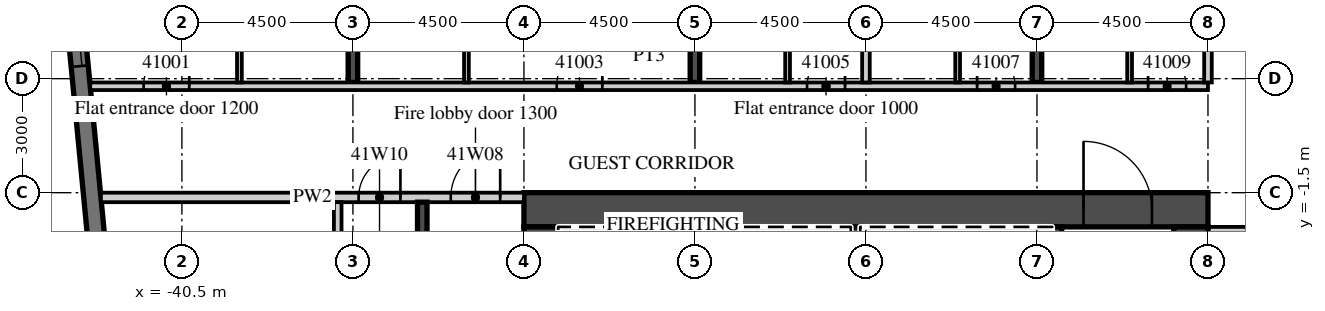
"""IFC4 building model, lengths in metres.
Left out: names, types, materials, properties, quantities, classifications, styles, units other than length and angle.
Written with IfcOpenShell. Run it as: python <this file> out.ifc"""

import sys

from ifc_helpers import new_model, si_unit, direction, frame, frame_2d, origin, place, context, subcontext, project, spatial, rectangle, extrude, element, fill, save


model = new_model("IFC4")
c1 = context("Model", 3, precision=1e-05, world=origin(), true_north=direction((0.0, 1.0)))
c2 = subcontext(c1, "Body", "Model", "MODEL_VIEW")
j1 = project(units=[si_unit("LENGTHUNIT", "METRE"), si_unit("PLANEANGLEUNIT", "RADIAN")], contexts=[c1])
p1 = place(None, origin())
s1 = spatial("IfcSite", under=j1, at=p1, CompositionType="ELEMENT")
p2 = place(p1, origin())
s2 = spatial("IfcBuilding", under=s1, at=p2, CompositionType="ELEMENT")
p3 = place(p2, frame((0.0, 0.0, 176.8)))
s3 = spatial("IfcBuildingStorey", under=s2, at=p3, CompositionType="ELEMENT", Elevation=176.8)
p4 = place(p3, frame((-36.0, 1.4, 0.0), z_axis=(0.0, 0.0, 1.0), x_axis=(0.0, 1.0, 0.0)))
e1 = element("IfcWall", 1, at=p4, inside=s3, PredefinedType="SHEAR", context=c2, shape_type="SweptSolid", body=[
    extrude(rectangle(XDim=15.401, YDim=0.25, at=frame_2d((7.701, 0.0))), origin(), (0.0, 0.0, 1.0), 3.3),
])
p5 = place(p3, frame((-27.0, 1.4, 0.0), z_axis=(0.0, 0.0, 1.0), x_axis=(0.0, 1.0, 0.0)))
e2 = element("IfcWall", 2, at=p5, inside=s3, PredefinedType="SHEAR", context=c2, shape_type="SweptSolid", body=[
    extrude(rectangle(XDim=16.268, YDim=0.25, at=frame_2d((8.134, 0.0))), origin(), (0.0, 0.0, 1.0), 3.3),
])
p6 = place(p3, frame((-18.0, 1.4, 0.0), z_axis=(0.0, 0.0, 1.0), x_axis=(0.0, 1.0, 0.0)))
e3 = element("IfcWall", 3, at=p6, inside=s3, PredefinedType="SHEAR", context=c2, shape_type="SweptSolid", body=[
    extrude(rectangle(XDim=17.134, YDim=0.25, at=frame_2d((8.567, 0.0))), origin(), (0.0, 0.0, 1.0), 3.3),
])
p7 = place(p3, frame((-44.214, 12.466, 0.0), z_axis=(0.0, 0.0, 1.0), x_axis=(0.095847314626, -0.995396047952, 0.0)))
e4 = element("IfcWall", 4, at=p7, inside=s3, PredefinedType="SOLIDWALL", context=c2, shape_type="SweptSolid", body=[
    extrude(rectangle(XDim=34.0, YDim=0.45, at=frame_2d((17.0, 0.0))), origin(), (0.0, 0.0, 1.0), 3.02),
])
p8 = place(p7, frame((2.865, 0.0, 0.45)))
e5 = element("IfcOpeningElement", 5, at=p8, cuts=e4, PredefinedType="OPENING", context=c2, shape_type="SweptSolid", body=[
    extrude(rectangle(XDim=3.3, YDim=2.25, at=frame_2d((1.65, 1.125))), frame((0.0, 0.235, 0.0), z_axis=(0.0, -1.0, 0.0), x_axis=(1.0, 0.0, 0.0)), (0.0, 0.0, 1.0), 0.47),
])
p9 = place(p7, frame((7.386, 0.0, 0.45)))
e6 = element("IfcOpeningElement", 6, at=p9, cuts=e4, PredefinedType="OPENING", context=c2, shape_type="SweptSolid", body=[
    extrude(rectangle(XDim=3.3, YDim=2.25, at=frame_2d((1.65, 1.125))), frame((0.0, 0.235, 0.0), z_axis=(0.0, -1.0, 0.0), x_axis=(1.0, 0.0, 0.0)), (0.0, 0.0, 1.0), 0.47),
])
p10 = place(p3, frame((-42.913, 1.3, 0.0), z_axis=(0.0, 0.0, 1.0), x_axis=(1.0, 0.0, 0.0)))
e7 = element("IfcWall", 7, at=p10, inside=s3, PredefinedType="PARTITIONING", context=c2, shape_type="SweptSolid", body=[
    extrude(rectangle(XDim=29.413, YDim=0.2, at=frame_2d((14.707, 0.0))), origin(), (0.0, 0.0, 1.0), 3.02),
])
p11 = place(p10, frame((1.406, 0.0, 0.0)))
e8 = element("IfcOpeningElement", 8, at=p11, cuts=e7, PredefinedType="OPENING", context=c2, shape_type="SweptSolid", body=[
    extrude(rectangle(XDim=1.2, YDim=2.1, at=frame_2d((0.6, 1.05))), frame((0.0, 0.11, 0.0), z_axis=(0.0, -1.0, 0.0), x_axis=(1.0, 0.0, 0.0)), (0.0, 0.0, 1.0), 0.22),
])
p12 = place(p10, frame((12.275, 0.0, 0.0)))
e9 = element("IfcOpeningElement", 9, at=p12, cuts=e7, PredefinedType="OPENING", context=c2, shape_type="SweptSolid", body=[
    extrude(rectangle(XDim=1.2, YDim=2.1, at=frame_2d((0.6, 1.05))), frame((0.0, 0.11, 0.0), z_axis=(0.0, -1.0, 0.0), x_axis=(1.0, 0.0, 0.0)), (0.0, 0.0, 1.0), 0.22),
])
p13 = place(p10, frame((18.863, 0.0, 0.0)))
e10 = element("IfcOpeningElement", 10, at=p13, cuts=e7, PredefinedType="OPENING", context=c2, shape_type="SweptSolid", body=[
    extrude(rectangle(XDim=1.0, YDim=2.1, at=frame_2d((0.5, 1.05))), frame((0.0, 0.11, 0.0), z_axis=(0.0, -1.0, 0.0), x_axis=(1.0, 0.0, 0.0)), (0.0, 0.0, 1.0), 0.22),
])
p14 = place(p10, frame((23.338, 0.0, 0.0)))
e11 = element("IfcOpeningElement", 11, at=p14, cuts=e7, PredefinedType="OPENING", context=c2, shape_type="SweptSolid", body=[
    extrude(rectangle(XDim=1.0, YDim=2.1, at=frame_2d((0.5, 1.05))), frame((0.0, 0.11, 0.0), z_axis=(0.0, -1.0, 0.0), x_axis=(1.0, 0.0, 0.0)), (0.0, 0.0, 1.0), 0.22),
])
p15 = place(p10, frame((27.838, 0.0, 0.0)))
e12 = element("IfcOpeningElement", 12, at=p15, cuts=e7, PredefinedType="OPENING", context=c2, shape_type="SweptSolid", body=[
    extrude(rectangle(XDim=1.0, YDim=2.1, at=frame_2d((0.5, 1.05))), frame((0.0, 0.11, 0.0), z_axis=(0.0, -1.0, 0.0), x_axis=(1.0, 0.0, 0.0)), (0.0, 0.0, 1.0), 0.22),
])
p16 = place(p3, frame((-38.987, 1.4, 0.0), z_axis=(0.0, 0.0, 1.0), x_axis=(0.0, 1.0, 0.0)))
e13 = element("IfcWall", 13, at=p16, inside=s3, PredefinedType="PARTITIONING", context=c2, shape_type="SweptSolid", body=[
    extrude(rectangle(XDim=4.028, YDim=0.125, at=frame_2d((2.014, 0.0))), origin(), (0.0, 0.0, 1.0), 3.02),
])
p17 = place(p16, frame((2.45, 0.0, 0.0)))
e14 = element("IfcOpeningElement", 14, at=p17, cuts=e13, PredefinedType="OPENING", context=c2, shape_type="SweptSolid", body=[
    extrude(rectangle(XDim=0.9, YDim=2.1, at=frame_2d((0.45, 1.05))), frame((0.0, 0.073, 0.0), z_axis=(0.0, -1.0, 0.0), x_axis=(1.0, 0.0, 0.0)), (0.0, 0.0, 1.0), 0.145),
])
p18 = place(p3, frame((-33.013, 1.4, 0.0), z_axis=(0.0, 0.0, 1.0), x_axis=(0.0, 1.0, 0.0)))
e15 = element("IfcWall", 15, at=p18, inside=s3, PredefinedType="PARTITIONING", context=c2, shape_type="SweptSolid", body=[
    extrude(rectangle(XDim=5.225, YDim=0.125, at=frame_2d((2.613, 0.0))), origin(), (0.0, 0.0, 1.0), 3.02),
])
p19 = place(p18, frame((2.45, 0.0, 0.0)))
e16 = element("IfcOpeningElement", 16, at=p19, cuts=e15, PredefinedType="OPENING", context=c2, shape_type="SweptSolid", body=[
    extrude(rectangle(XDim=0.9, YDim=2.1, at=frame_2d((0.45, 1.05))), frame((0.0, 0.073, 0.0), z_axis=(0.0, -1.0, 0.0), x_axis=(1.0, 0.0, 0.0)), (0.0, 0.0, 1.0), 0.145),
])
p20 = place(p3, frame((-22.5, 1.4, 0.0), z_axis=(0.0, 0.0, 1.0), x_axis=(0.0, 1.0, 0.0)))
e17 = element("IfcWall", 17, at=p20, inside=s3, PredefinedType="PARTITIONING", context=c2, shape_type="SweptSolid", body=[
    extrude(rectangle(XDim=16.723, YDim=0.2, at=frame_2d((8.362, 0.0))), origin(), (0.0, 0.0, 1.0), 3.02),
])
p21 = place(p3, frame((-24.562, 1.4, 0.0), z_axis=(0.0, 0.0, 1.0), x_axis=(0.0, 1.0, 0.0)))
e18 = element("IfcWall", 18, at=p21, inside=s3, PredefinedType="PARTITIONING", context=c2, shape_type="SweptSolid", body=[
    extrude(rectangle(XDim=5.225, YDim=0.125, at=frame_2d((2.613, 0.0))), origin(), (0.0, 0.0, 1.0), 3.02),
])
p22 = place(p21, frame((2.45, 0.0, 0.0)))
e19 = element("IfcOpeningElement", 19, at=p22, cuts=e18, PredefinedType="OPENING", context=c2, shape_type="SweptSolid", body=[
    extrude(rectangle(XDim=0.9, YDim=2.1, at=frame_2d((0.45, 1.05))), frame((0.0, 0.073, 0.0), z_axis=(0.0, -1.0, 0.0), x_axis=(1.0, 0.0, 0.0)), (0.0, 0.0, 1.0), 0.145),
])
p23 = place(p3, frame((-20.087, 1.4, 0.0), z_axis=(0.0, 0.0, 1.0), x_axis=(0.0, 1.0, 0.0)))
e20 = element("IfcWall", 20, at=p23, inside=s3, PredefinedType="PARTITIONING", context=c2, shape_type="SweptSolid", body=[
    extrude(rectangle(XDim=5.225, YDim=0.125, at=frame_2d((2.613, 0.0))), origin(), (0.0, 0.0, 1.0), 3.02),
])
p24 = place(p23, frame((2.45, 0.0, 0.0)))
e21 = element("IfcOpeningElement", 21, at=p24, cuts=e20, PredefinedType="OPENING", context=c2, shape_type="SweptSolid", body=[
    extrude(rectangle(XDim=0.9, YDim=2.1, at=frame_2d((0.45, 1.05))), frame((0.0, 0.073, 0.0), z_axis=(0.0, -1.0, 0.0), x_axis=(1.0, 0.0, 0.0)), (0.0, 0.0, 1.0), 0.145),
])
p25 = place(p3, frame((-13.5, 1.4, 0.0), z_axis=(0.0, 0.0, 1.0), x_axis=(0.0, 1.0, 0.0)))
e22 = element("IfcWall", 22, at=p25, inside=s3, PredefinedType="PARTITIONING", context=c2, shape_type="SweptSolid", body=[
    extrude(rectangle(XDim=17.59, YDim=0.2, at=frame_2d((8.795, 0.0))), origin(), (0.0, 0.0, 1.0), 3.02),
])
p26 = place(p3, frame((-15.562, 1.4, 0.0), z_axis=(0.0, 0.0, 1.0), x_axis=(0.0, 1.0, 0.0)))
e23 = element("IfcWall", 23, at=p26, inside=s3, PredefinedType="PARTITIONING", context=c2, shape_type="SweptSolid", body=[
    extrude(rectangle(XDim=5.225, YDim=0.125, at=frame_2d((2.613, 0.0))), origin(), (0.0, 0.0, 1.0), 3.02),
])
p27 = place(p26, frame((2.45, 0.0, 0.0)))
e24 = element("IfcOpeningElement", 24, at=p27, cuts=e23, PredefinedType="OPENING", context=c2, shape_type="SweptSolid", body=[
    extrude(rectangle(XDim=0.9, YDim=2.1, at=frame_2d((0.45, 1.05))), frame((0.0, 0.073, 0.0), z_axis=(0.0, -1.0, 0.0), x_axis=(1.0, 0.0, 0.0)), (0.0, 0.0, 1.0), 0.145),
])
p28 = place(p3, frame((-13.5, -2.5, 0.0), z_axis=(0.0, 0.0, 1.0), x_axis=(1.0, 0.0, 0.0)))
e25 = element("IfcWall", 25, at=p28, inside=s3, PredefinedType="PARTITIONING", context=c2, shape_type="SweptSolid", body=[
    extrude(rectangle(XDim=27.0, YDim=0.2, at=frame_2d((13.5, 0.0))), origin(), (0.0, 0.0, 1.0), 3.02),
])
p29 = place(p28, frame((2.925, 0.0, 0.0)))
e26 = element("IfcOpeningElement", 26, at=p29, cuts=e25, PredefinedType="OPENING", context=c2, shape_type="SweptSolid", body=[
    extrude(rectangle(XDim=1.0, YDim=2.1, at=frame_2d((0.5, 1.05))), frame((0.0, 0.11, 0.0), z_axis=(0.0, -1.0, 0.0), x_axis=(1.0, 0.0, 0.0)), (0.0, 0.0, 1.0), 0.22),
])
p30 = place(p28, frame((7.45, 0.0, 0.0)))
e27 = element("IfcOpeningElement", 27, at=p30, cuts=e25, PredefinedType="OPENING", context=c2, shape_type="SweptSolid", body=[
    extrude(rectangle(XDim=1.0, YDim=2.1, at=frame_2d((0.5, 1.05))), frame((0.0, 0.11, 0.0), z_axis=(0.0, -1.0, 0.0), x_axis=(1.0, 0.0, 0.0)), (0.0, 0.0, 1.0), 0.22),
])
p31 = place(p28, frame((11.925, 0.0, 0.0)))
e28 = element("IfcOpeningElement", 28, at=p31, cuts=e25, PredefinedType="OPENING", context=c2, shape_type="SweptSolid", body=[
    extrude(rectangle(XDim=1.0, YDim=2.1, at=frame_2d((0.5, 1.05))), frame((0.0, 0.11, 0.0), z_axis=(0.0, -1.0, 0.0), x_axis=(1.0, 0.0, 0.0)), (0.0, 0.0, 1.0), 0.22),
])
p32 = place(p28, frame((18.862, 0.0, 0.0)))
e29 = element("IfcOpeningElement", 29, at=p32, cuts=e25, PredefinedType="OPENING", context=c2, shape_type="SweptSolid", body=[
    extrude(rectangle(XDim=1.2, YDim=2.1, at=frame_2d((0.6, 1.05))), frame((0.0, 0.11, 0.0), z_axis=(0.0, -1.0, 0.0), x_axis=(1.0, 0.0, 0.0)), (0.0, 0.0, 1.0), 0.22),
])
p33 = place(p28, frame((25.425, 0.0, 0.0)))
e30 = element("IfcOpeningElement", 30, at=p33, cuts=e25, PredefinedType="OPENING", context=c2, shape_type="SweptSolid", body=[
    extrude(rectangle(XDim=1.0, YDim=2.1, at=frame_2d((0.5, 1.05))), frame((0.0, 0.11, 0.0), z_axis=(0.0, -1.0, 0.0), x_axis=(1.0, 0.0, 0.0)), (0.0, 0.0, 1.0), 0.22),
])
p34 = place(p3, frame((-31.5, -1.95, 0.0), z_axis=(0.0, 0.0, 1.0), x_axis=(1.0, 0.0, 0.0)))
e31 = element("IfcWall", 31, at=p34, inside=s3, PredefinedType="SHEAR", context=c2, shape_type="SweptSolid", body=[
    extrude(rectangle(XDim=18.0, YDim=0.9, at=frame_2d((9.0, 0.0))), origin(), (0.0, 0.0, 1.0), 3.02),
])
p35 = place(p34, frame((14.725, 0.0, 0.0)))
e32 = element("IfcOpeningElement", 32, at=p35, cuts=e31, PredefinedType="OPENING", context=c2, shape_type="SweptSolid", body=[
    extrude(rectangle(XDim=1.8, YDim=2.1, at=frame_2d((0.9, 1.05))), frame((0.0, 0.46, 0.0), z_axis=(0.0, -1.0, 0.0), x_axis=(1.0, 0.0, 0.0)), (0.0, 0.0, 1.0), 0.92),
])
p36 = place(p3, frame((-31.05, -15.2, 0.0), z_axis=(0.0, 0.0, 1.0), x_axis=(0.0, 1.0, 0.0)))
e33 = element("IfcWall", 33, at=p36, inside=s3, PredefinedType="SHEAR", context=c2, shape_type="SweptSolid", body=[
    extrude(rectangle(XDim=12.8, YDim=0.9, at=frame_2d((6.4, 0.0))), origin(), (0.0, 0.0, 1.0), 3.02),
])
p37 = place(p36, frame((11.5, 0.0, 0.0)))
e34 = element("IfcOpeningElement", 34, at=p37, cuts=e33, PredefinedType="OPENING", context=c2, shape_type="SweptSolid", body=[
    extrude(rectangle(XDim=1.1, YDim=2.1, at=frame_2d((0.55, 1.05))), frame((0.0, 0.46, 0.0), z_axis=(0.0, -1.0, 0.0), x_axis=(1.0, 0.0, 0.0)), (0.0, 0.0, 1.0), 0.92),
])
p38 = place(p3, frame((-13.95, -14.6, 0.0), z_axis=(0.0, 0.0, 1.0), x_axis=(0.0, 1.0, 0.0)))
e35 = element("IfcWall", 35, at=p38, inside=s3, PredefinedType="SHEAR", context=c2, shape_type="SweptSolid", body=[
    extrude(rectangle(XDim=12.2, YDim=0.9, at=frame_2d((6.1, 0.0))), origin(), (0.0, 0.0, 1.0), 3.02),
])
p39 = place(p3, frame((-17.475, -5.55, 0.0), z_axis=(0.0, 0.0, 1.0), x_axis=(0.0, 1.0, 0.0)))
e36 = element("IfcWall", 36, at=p39, inside=s3, PredefinedType="SHEAR", context=c2, shape_type="SweptSolid", body=[
    extrude(rectangle(XDim=3.15, YDim=0.25, at=frame_2d((1.575, 0.0))), origin(), (0.0, 0.0, 1.0), 3.02),
])
for number, where, z_axis, x_axis in (
    (37, (-27.975, -5.3, 0.0), (0.0, 0.0, 1.0), (0.0, 1.0, 0.0)),
    (38, (-22.775, -5.3, 0.0), (0.0, 0.0, 1.0), (0.0, 1.0, 0.0)),
):
    element("IfcWall", number, at=place(p3, frame(where, z_axis=z_axis, x_axis=x_axis)), inside=s3, PredefinedType="SHEAR", context=c2, shape_type="SweptSolid", body=[
        extrude(rectangle(XDim=2.9, YDim=0.25, at=frame_2d((1.45, 0.0))), origin(), (0.0, 0.0, 1.0), 3.02),
    ])
p40 = place(p3, frame((-42.632, -1.625, 0.0), z_axis=(0.0, 0.0, 1.0), x_axis=(1.0, 0.0, 0.0)))
e39 = element("IfcWall", 39, at=p40, inside=s3, PredefinedType="PARTITIONING", context=c2, shape_type="SweptSolid", body=[
    extrude(rectangle(XDim=11.132, YDim=0.25, at=frame_2d((5.566, 0.0))), origin(), (0.0, 0.0, 1.0), 3.02),
])
p41 = place(p40, frame((9.207, 0.0, 0.0)))
e40 = element("IfcOpeningElement", 40, at=p41, cuts=e39, PredefinedType="OPENING", context=c2, shape_type="SweptSolid", body=[
    extrude(rectangle(XDim=1.3, YDim=2.1, at=frame_2d((0.65, 1.05))), frame((0.0, 0.135, 0.0), z_axis=(0.0, -1.0, 0.0), x_axis=(1.0, 0.0, 0.0)), (0.0, 0.0, 1.0), 0.27),
])
p42 = place(p40, frame((6.781, 0.0, 0.0)))
e41 = element("IfcOpeningElement", 41, at=p42, cuts=e39, PredefinedType="OPENING", context=c2, shape_type="SweptSolid", body=[
    extrude(rectangle(XDim=1.1, YDim=2.1, at=frame_2d((0.55, 1.05))), frame((0.0, 0.135, 0.0), z_axis=(0.0, -1.0, 0.0), x_axis=(1.0, 0.0, 0.0)), (0.0, 0.0, 1.0), 0.27),
])
p43 = place(p3, frame((-34.175, -10.1, 0.0), z_axis=(0.0, 0.0, 1.0), x_axis=(0.0, 1.0, 0.0)))
e42 = element("IfcWall", 42, at=p43, inside=s3, PredefinedType="SHEAR", context=c2, shape_type="SweptSolid", body=[
    extrude(rectangle(XDim=8.35, YDim=0.25, at=frame_2d((4.175, 0.0))), origin(), (0.0, 0.0, 1.0), 3.02),
])
p44 = place(p3, frame((-36.4, -17.7, 0.0), z_axis=(0.0, 0.0, 1.0), x_axis=(0.0, 1.0, 0.0)))
e43 = element("IfcWall", 43, at=p44, inside=s3, PredefinedType="PARTITIONING", context=c2, shape_type="SweptSolid", body=[
    extrude(rectangle(XDim=15.95, YDim=0.2, at=frame_2d((7.975, 0.0))), origin(), (0.0, 0.0, 1.0), 3.02),
])
p45 = place(p44, frame((0.35, 0.0, 0.0)))
e44 = element("IfcOpeningElement", 44, at=p45, cuts=e43, PredefinedType="OPENING", context=c2, shape_type="SweptSolid", body=[
    extrude(rectangle(XDim=0.9, YDim=2.1, at=frame_2d((0.45, 1.05))), frame((0.0, 0.11, 0.0), z_axis=(0.0, -1.0, 0.0), x_axis=(1.0, 0.0, 0.0)), (0.0, 0.0, 1.0), 0.22),
])
p46 = place(p9, origin())
e45 = element("IfcWindow", 45, at=p46, inside=s3, PartitioningType="SINGLE_PANEL", PredefinedType="WINDOW", context=c2, shape_type="SweptSolid", body=[
    extrude(rectangle(XDim=3.3, YDim=2.25, at=frame_2d((1.65, 1.125))), frame((0.0, 0.09, 0.0), z_axis=(0.0, -1.0, 0.0), x_axis=(1.0, 0.0, 0.0)), (0.0, 0.0, 1.0), 0.06),
])
fill(e6, e45)
p47 = place(p11, origin())
e46 = element("IfcDoor", 46, at=p47, inside=s3, OperationType="SINGLE_SWING_RIGHT", PredefinedType="DOOR", context=c2, shape_type="SweptSolid", body=[
    extrude(rectangle(XDim=1.2, YDim=2.1, at=frame_2d((0.6, 1.05))), frame((0.0, 0.025, 0.0), z_axis=(0.0, -1.0, 0.0), x_axis=(1.0, 0.0, 0.0)), (0.0, 0.0, 1.0), 0.05),
])
fill(e8, e46)
p48 = place(p12, origin())
e47 = element("IfcDoor", 47, at=p48, inside=s3, OperationType="SINGLE_SWING_RIGHT", PredefinedType="DOOR", context=c2, shape_type="SweptSolid", body=[
    extrude(rectangle(XDim=1.2, YDim=2.1, at=frame_2d((0.6, 1.05))), frame((0.0, 0.025, 0.0), z_axis=(0.0, -1.0, 0.0), x_axis=(1.0, 0.0, 0.0)), (0.0, 0.0, 1.0), 0.05),
])
fill(e9, e47)
p49 = place(p13, origin())
e48 = element("IfcDoor", 48, at=p49, inside=s3, OperationType="SINGLE_SWING_RIGHT", PredefinedType="DOOR", context=c2, shape_type="SweptSolid", body=[
    extrude(rectangle(XDim=1.0, YDim=2.1, at=frame_2d((0.5, 1.05))), frame((0.0, 0.025, 0.0), z_axis=(0.0, -1.0, 0.0), x_axis=(1.0, 0.0, 0.0)), (0.0, 0.0, 1.0), 0.05),
])
fill(e10, e48)
p50 = place(p14, origin())
e49 = element("IfcDoor", 49, at=p50, inside=s3, OperationType="SINGLE_SWING_LEFT", PredefinedType="DOOR", context=c2, shape_type="SweptSolid", body=[
    extrude(rectangle(XDim=1.0, YDim=2.1, at=frame_2d((0.5, 1.05))), frame((0.0, 0.025, 0.0), z_axis=(0.0, -1.0, 0.0), x_axis=(1.0, 0.0, 0.0)), (0.0, 0.0, 1.0), 0.05),
])
fill(e11, e49)
p51 = place(p15, origin())
e50 = element("IfcDoor", 50, at=p51, inside=s3, OperationType="SINGLE_SWING_LEFT", PredefinedType="DOOR", context=c2, shape_type="SweptSolid", body=[
    extrude(rectangle(XDim=1.0, YDim=2.1, at=frame_2d((0.5, 1.05))), frame((0.0, 0.025, 0.0), z_axis=(0.0, -1.0, 0.0), x_axis=(1.0, 0.0, 0.0)), (0.0, 0.0, 1.0), 0.05),
])
fill(e12, e50)
p52 = place(p35, origin())
e51 = element("IfcDoor", 51, at=p52, inside=s3, OperationType="DOUBLE_DOOR_DOUBLE_SWING", PredefinedType="DOOR", context=c2, shape_type="SweptSolid", body=[
    extrude(rectangle(XDim=1.8, YDim=2.1, at=frame_2d((0.9, 1.05))), frame((0.0, 0.025, 0.0), z_axis=(0.0, -1.0, 0.0), x_axis=(1.0, 0.0, 0.0)), (0.0, 0.0, 1.0), 0.05),
])
fill(e32, e51)
p53 = place(p41, origin())
e52 = element("IfcDoor", 52, at=p53, inside=s3, OperationType="SINGLE_SWING_RIGHT", PredefinedType="DOOR", context=c2, shape_type="SweptSolid", body=[
    extrude(rectangle(XDim=1.3, YDim=2.1, at=frame_2d((0.65, 1.05))), frame((0.0, 0.025, 0.0), z_axis=(0.0, -1.0, 0.0), x_axis=(1.0, 0.0, 0.0)), (0.0, 0.0, 1.0), 0.05),
])
fill(e40, e52)
p54 = place(p42, origin())
e53 = element("IfcDoor", 53, at=p54, inside=s3, OperationType="SINGLE_SWING_RIGHT", PredefinedType="DOOR", context=c2, shape_type="SweptSolid", body=[
    extrude(rectangle(XDim=1.1, YDim=2.1, at=frame_2d((0.55, 1.05))), frame((0.0, 0.025, 0.0), z_axis=(0.0, -1.0, 0.0), x_axis=(1.0, 0.0, 0.0)), (0.0, 0.0, 1.0), 0.05),
])
fill(e41, e53)
save(model, sys.argv[1])
